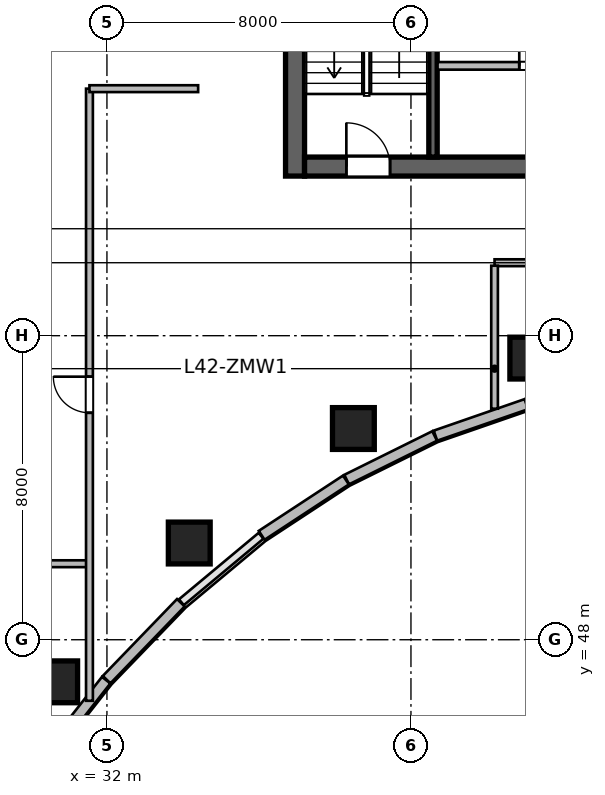
"""IFC4 building model, lengths in metres.
Left out: names, types, materials, properties, quantities, classifications, styles, units other than length and angle.
Written with IfcOpenShell. Run it as: python <this file> out.ifc"""

import sys

from ifc_helpers import new_model, si_unit, direction, frame, frame_2d, origin, origin_2d, place, context, subcontext, project, spatial, rectangle, circle, extrude, source, transform, mapped, element, fill, save


model = new_model("IFC4")
c1 = context("Model", 3, precision=1e-05, world=origin(), true_north=direction((0.0, 1.0)))
c2 = subcontext(c1, "Body", "Model", "MODEL_VIEW")
j1 = project(units=[si_unit("LENGTHUNIT", "METRE"), si_unit("PLANEANGLEUNIT", "RADIAN")], contexts=[c1])
p1 = place(None, origin())
s1 = spatial("IfcSite", under=j1, at=p1, CompositionType="ELEMENT")
p2 = place(p1, origin())
s2 = spatial("IfcBuilding", under=s1, at=p2, CompositionType="ELEMENT")
p3 = place(p2, frame((0.0, 0.0, 174.0)))
s3 = spatial("IfcBuildingStorey", under=s2, at=p3, CompositionType="ELEMENT", Elevation=174.0)
m1 = source(origin(), c2, "Body", "SweptSolid", [
    extrude(rectangle(XDim=12.0, YDim=0.5, at=frame_2d((6.0, 0.0))), origin(), (0.0, 0.0, 1.0), 3.9),
])
p4 = place(p3, frame((36.95, 60.2, 0.0), z_axis=(0.0, 0.0, 1.0), x_axis=(0.0, 1.0, 0.0)))
e1 = element("IfcWall", 1, at=p4, inside=s3, PredefinedType="SHEAR", context=c2, shape_type="MappedRepresentation", body=[
    mapped(m1, transform((0.0, 0.0, 0.0), scale=1.0)),
])
m2 = source(origin(), c2, "Body", "SweptSolid", [
    extrude(rectangle(XDim=21.6, YDim=0.5, at=frame_2d((10.8, 0.0))), origin(), (0.0, 0.0, 1.0), 3.9),
])
p5 = place(p3, frame((37.2, 60.45, 0.0), z_axis=(0.0, 0.0, 1.0), x_axis=(1.0, 0.0, 0.0)))
e2 = element("IfcWall", 2, at=p5, inside=s3, PredefinedType="SHEAR", context=c2, shape_type="MappedRepresentation", body=[
    mapped(m2, transform((0.0, 0.0, 0.0), scale=1.0)),
])
p6 = place(p5, frame((1.1, 0.0, 0.0)))
e3 = element("IfcOpeningElement", 3, at=p6, cuts=e2, PredefinedType="OPENING", context=c2, shape_type="SweptSolid", body=[
    extrude(rectangle(XDim=1.15, YDim=2.15, at=frame_2d((0.575, 1.075))), frame((0.0, 0.26, 0.0), z_axis=(0.0, -1.0, 0.0), x_axis=(1.0, 0.0, 0.0)), (0.0, 0.0, 1.0), 0.52),
])
p7 = place(p5, frame((19.5, 0.0, 0.0)))
e4 = element("IfcOpeningElement", 4, at=p7, cuts=e2, PredefinedType="OPENING", context=c2, shape_type="SweptSolid", body=[
    extrude(rectangle(XDim=0.9, YDim=2.1, at=frame_2d((0.45, 1.05))), frame((0.0, 0.26, 0.0), z_axis=(0.0, -1.0, 0.0), x_axis=(1.0, 0.0, 0.0)), (0.0, 0.0, 1.0), 0.52),
])
p8 = place(p5, frame((12.02, 0.0, 0.0)))
e5 = element("IfcOpeningElement", 5, at=p8, cuts=e2, PredefinedType="OPENING", context=c2, shape_type="SweptSolid", body=[
    extrude(rectangle(XDim=1.6, YDim=2.15, at=frame_2d((0.8, 1.075))), frame((0.0, 0.26, 0.0), z_axis=(0.0, -1.0, 0.0), x_axis=(1.0, 0.0, 0.0)), (0.0, 0.0, 1.0), 0.52),
])
m3 = source(origin(), c2, "Body", "SweptSolid", [
    extrude(rectangle(XDim=11.0, YDim=0.22, at=frame_2d((5.5, 0.0))), origin(), (0.0, 0.0, 1.0), 3.9),
])
p9 = place(p3, frame((40.58, 60.7, 0.0), z_axis=(0.0, 0.0, 1.0), x_axis=(0.0, 1.0, 0.0)))
e6 = element("IfcWall", 6, at=p9, inside=s3, PredefinedType="SHEAR", context=c2, shape_type="MappedRepresentation", body=[
    mapped(m3, transform((0.0, 0.0, 0.0), scale=1.0)),
])
m4 = source(origin(), c2, "Body", "SweptSolid", [
    extrude(circle(Radius=0.55, at=origin_2d()), origin(), (0.0, 0.0, 1.0), 3.9),
])
for number, where, z_axis, x_axis in (
    (7, (30.677, 46.892, 0.0), (0.0, 0.0, 1.0), (-0.571, 0.821, 0.0)),
    (8, (34.166, 50.545, 0.0), (0.0, 0.0, 1.0), (-0.436, 0.9, 0.0)),
    (9, (38.485, 53.558, 0.0), (0.0, 0.0, 1.0), (-0.289, 0.957, 0.0)),
    (10, (43.154, 55.411, 0.0), (0.0, 0.0, 1.0), (-0.143, 0.99, 0.0)),
):
    element("IfcColumn", number, at=place(p3, frame(where, z_axis=z_axis, x_axis=x_axis)), inside=s3, PredefinedType="COLUMN", context=c2, shape_type="MappedRepresentation", body=[
        mapped(m4, transform((0.0, 0.0, 0.0), scale=1.0)),
    ])
m5 = source(origin(), c2, "Body", "SweptSolid", [
    extrude(rectangle(XDim=2.53, YDim=0.28, at=frame_2d((1.265, 0.0))), origin(), (0.0, 0.0, 1.0), 3.65),
])
p10 = place(p3, frame((43.035, 54.198, 0.0), z_axis=(0.0, 0.0, 1.0), x_axis=(-0.944872429646, -0.327438683872, 0.0)))
e11 = element("IfcWall", 11, at=p10, inside=s3, PredefinedType="SOLIDWALL", context=c2, shape_type="MappedRepresentation", body=[
    mapped(m5, transform((0.0, 0.0, 0.0), scale=1.0)),
])
m6 = source(origin(), c2, "Body", "SweptSolid", [
    extrude(rectangle(XDim=2.584, YDim=0.28, at=frame_2d((1.292, 0.0))), origin(), (0.0, 0.0, 1.0), 3.65),
])
p11 = place(p3, frame((40.624, 53.361, 0.0), z_axis=(0.0, 0.0, 1.0), x_axis=(-0.895989792847, -0.44407464588, 0.0)))
e12 = element("IfcWall", 12, at=p11, inside=s3, PredefinedType="SOLIDWALL", context=c2, shape_type="MappedRepresentation", body=[
    mapped(m6, transform((0.0, 0.0, 0.0), scale=1.0)),
])
m7 = source(origin(), c2, "Body", "SweptSolid", [
    extrude(rectangle(XDim=2.652, YDim=0.28, at=frame_2d((1.326, 0.0))), origin(), (0.0, 0.0, 1.0), 3.65),
])
p12 = place(p3, frame((38.289, 52.202, 0.0), z_axis=(0.0, 0.0, 1.0), x_axis=(-0.836008323535, -0.54871676025, 0.0)))
e13 = element("IfcWall", 13, at=p12, inside=s3, PredefinedType="SOLIDWALL", context=c2, shape_type="MappedRepresentation", body=[
    mapped(m7, transform((0.0, 0.0, 0.0), scale=1.0)),
])
m8 = source(origin(), c2, "Body", "SweptSolid", [
    extrude(rectangle(XDim=2.812, YDim=0.28, at=frame_2d((1.406, 0.0))), origin(), (0.0, 0.0, 1.0), 3.65),
])
p13 = place(p3, frame((33.945, 48.973, 0.0), z_axis=(0.0, 0.0, 1.0), x_axis=(-0.694583668785, -0.719411931411, 0.0)))
e14 = element("IfcWall", 14, at=p13, inside=s3, PredefinedType="SOLIDWALL", context=c2, shape_type="MappedRepresentation", body=[
    mapped(m8, transform((0.0, 0.0, 0.0), scale=1.0)),
])
m9 = source(origin(), c2, "Body", "SweptSolid", [
    extrude(rectangle(XDim=2.897, YDim=0.28, at=frame_2d((1.448, 0.0))), origin(), (0.0, 0.0, 1.0), 3.65),
])
p14 = place(p3, frame((31.979, 46.936, 0.0), z_axis=(0.0, 0.0, 1.0), x_axis=(-0.618167636915, -0.786046291685, 0.0)))
e15 = element("IfcWall", 15, at=p14, inside=s3, PredefinedType="SOLIDWALL", context=c2, shape_type="MappedRepresentation", body=[
    mapped(m9, transform((0.0, 0.0, 0.0), scale=1.0)),
])
m10 = source(origin(), c2, "Body", "SweptSolid", [
    extrude(rectangle(XDim=8.02, YDim=0.2, at=frame_2d((4.01, 0.0))), origin(), (0.0, 0.0, 1.0), 3.65),
])
p15 = place(p3, frame((40.7, 63.1, 0.0), z_axis=(0.0, 0.0, 1.0), x_axis=(1.0, 0.0, 0.0)))
e16 = element("IfcWall", 16, at=p15, inside=s3, PredefinedType="SOLIDWALL", context=c2, shape_type="MappedRepresentation", body=[
    mapped(m10, transform((0.0, 0.0, 0.0), scale=1.0)),
])
p16 = place(p15, frame((2.15, 0.0, 0.0)))
e17 = element("IfcOpeningElement", 17, at=p16, cuts=e16, PredefinedType="OPENING", context=c2, shape_type="SweptSolid", body=[
    extrude(rectangle(XDim=0.9, YDim=2.1, at=frame_2d((0.45, 1.05))), frame((0.0, 0.11, 0.0), z_axis=(0.0, -1.0, 0.0), x_axis=(1.0, 0.0, 0.0)), (0.0, 0.0, 1.0), 0.22),
])
p17 = place(p15, frame((6.09, 0.0, 0.0)))
e18 = element("IfcOpeningElement", 18, at=p17, cuts=e16, PredefinedType="OPENING", context=c2, shape_type="SweptSolid", body=[
    extrude(rectangle(XDim=0.9, YDim=2.1, at=frame_2d((0.45, 1.05))), frame((0.0, 0.11, 0.0), z_axis=(0.0, -1.0, 0.0), x_axis=(1.0, 0.0, 0.0)), (0.0, 0.0, 1.0), 0.22),
])
m11 = source(origin(), c2, "Body", "SweptSolid", [
    extrude(rectangle(XDim=4.176, YDim=0.18, at=frame_2d((2.088, 0.0))), origin(), (0.0, 0.0, 1.0), 3.65),
])
p18 = place(p3, frame((42.2, 57.92, 0.0), z_axis=(0.0, 0.0, 1.0), x_axis=(1.0, 0.0, 0.0)))
e19 = element("IfcWall", 19, at=p18, inside=s3, PredefinedType="PLUMBINGWALL", context=c2, shape_type="MappedRepresentation", body=[
    mapped(m11, transform((0.0, 0.0, 0.0), scale=1.0)),
])
p19 = place(p18, frame((1.638, 0.0, 0.0)))
e20 = element("IfcOpeningElement", 20, at=p19, cuts=e19, PredefinedType="OPENING", context=c2, shape_type="SweptSolid", body=[
    extrude(rectangle(XDim=0.9, YDim=2.08, at=frame_2d((0.45, 1.04))), frame((0.0, 0.1, 0.0), z_axis=(0.0, -1.0, 0.0), x_axis=(1.0, 0.0, 0.0)), (0.0, 0.0, 1.0), 0.2),
])
m12 = source(origin(), c2, "Body", "SweptSolid", [
    extrude(rectangle(XDim=3.763, YDim=0.175, at=frame_2d((1.881, 0.0))), origin(), (0.0, 0.0, 1.0), 3.65),
])
p20 = place(p3, frame((42.2, 54.079, 0.0), z_axis=(0.0, 0.0, 1.0), x_axis=(0.0, 1.0, 0.0)))
e21 = element("IfcWall", 21, at=p20, inside=s3, PredefinedType="PARTITIONING", context=c2, shape_type="MappedRepresentation", body=[
    mapped(m12, transform((0.0, 0.0, 0.0), scale=1.0)),
])
m13 = source(origin(), c2, "Body", "SweptSolid", [
    extrude(rectangle(XDim=2.5, YDim=0.18, at=frame_2d((1.25, 0.0))), origin(), (0.0, 0.0, 1.0), 3.65),
])
p21 = place(p3, frame((29.0, 50.0, 0.0), z_axis=(0.0, 0.0, 1.0), x_axis=(1.0, 0.0, 0.0)))
e22 = element("IfcWall", 22, at=p21, inside=s3, PredefinedType="PLUMBINGWALL", context=c2, shape_type="MappedRepresentation", body=[
    mapped(m13, transform((0.0, 0.0, 0.0), scale=1.0)),
])
m14 = source(origin(), c2, "Body", "SweptSolid", [
    extrude(rectangle(XDim=16.106, YDim=0.18, at=frame_2d((8.053, 0.0))), origin(), (0.0, 0.0, 1.0), 2.942),
])
p22 = place(p3, frame((31.54, 46.394, 0.0), z_axis=(0.0, 0.0, 1.0), x_axis=(0.0, 1.0, 0.0)))
e23 = element("IfcWall", 23, at=p22, inside=s3, PredefinedType="PLUMBINGWALL", context=c2, shape_type="MappedRepresentation", body=[
    mapped(m14, transform((0.0, 0.0, 0.0), scale=1.0)),
])
p23 = place(p22, frame((7.578, 0.0, 0.0)))
e24 = element("IfcOpeningElement", 24, at=p23, cuts=e23, PredefinedType="OPENING", context=c2, shape_type="SweptSolid", body=[
    extrude(rectangle(XDim=0.95, YDim=2.1, at=frame_2d((0.475, 1.05))), frame((0.0, 0.1, 0.0), z_axis=(0.0, -1.0, 0.0), x_axis=(1.0, 0.0, 0.0)), (0.0, 0.0, 1.0), 0.2),
])
m15 = source(origin(), c2, "Body", "SweptSolid", [
    extrude(rectangle(XDim=2.86, YDim=0.18, at=frame_2d((1.43, 0.0))), origin(), (0.0, 0.0, 1.0), 3.65),
])
p24 = place(p3, frame((31.54, 62.5, 0.0), z_axis=(0.0, 0.0, 1.0), x_axis=(1.0, 0.0, 0.0)))
e25 = element("IfcWall", 25, at=p24, inside=s3, PredefinedType="PLUMBINGWALL", context=c2, shape_type="MappedRepresentation", body=[
    mapped(m15, transform((0.0, 0.0, 0.0), scale=1.0)),
])
m16 = source(origin(), c2, "Body", "SweptSolid", [
    extrude(rectangle(XDim=1.15, YDim=2.15, at=frame_2d((0.575, 1.075))), frame((0.0, 0.025, 0.0), z_axis=(0.0, -1.0, 0.0), x_axis=(1.0, 0.0, 0.0)), (0.0, 0.0, 1.0), 0.05),
])
p25 = place(p6, origin())
e26 = element("IfcDoor", 26, at=p25, inside=s3, OperationType="SINGLE_SWING_LEFT", PredefinedType="DOOR", context=c2, shape_type="MappedRepresentation", body=[
    mapped(m16, transform((0.0, 0.0, 0.0), scale=1.0)),
])
fill(e3, e26)
m17 = source(origin(), c2, "Body", "SweptSolid", [
    extrude(rectangle(XDim=0.9, YDim=2.1, at=frame_2d((0.45, 1.05))), frame((0.0, 0.025, 0.0), z_axis=(0.0, -1.0, 0.0), x_axis=(1.0, 0.0, 0.0)), (0.0, 0.0, 1.0), 0.05),
])
p26 = place(p16, origin())
e27 = element("IfcDoor", 27, at=p26, inside=s3, OperationType="SINGLE_SWING_LEFT", PredefinedType="DOOR", context=c2, shape_type="MappedRepresentation", body=[
    mapped(m17, transform((0.0, 0.0, 0.0), scale=1.0)),
])
fill(e17, e27)
m18 = source(origin(), c2, "Body", "SweptSolid", [
    extrude(rectangle(XDim=0.95, YDim=2.1, at=frame_2d((0.475, 1.05))), frame((0.0, 0.025, 0.0), z_axis=(0.0, -1.0, 0.0), x_axis=(1.0, 0.0, 0.0)), (0.0, 0.0, 1.0), 0.05),
])
p27 = place(p23, origin())
e28 = element("IfcDoor", 28, at=p27, inside=s3, OperationType="SINGLE_SWING_RIGHT", PredefinedType="DOOR", context=c2, shape_type="MappedRepresentation", body=[
    mapped(m18, transform((0.0, 0.0, 0.0), scale=1.0)),
])
fill(e24, e28)
save(model, sys.argv[1])
